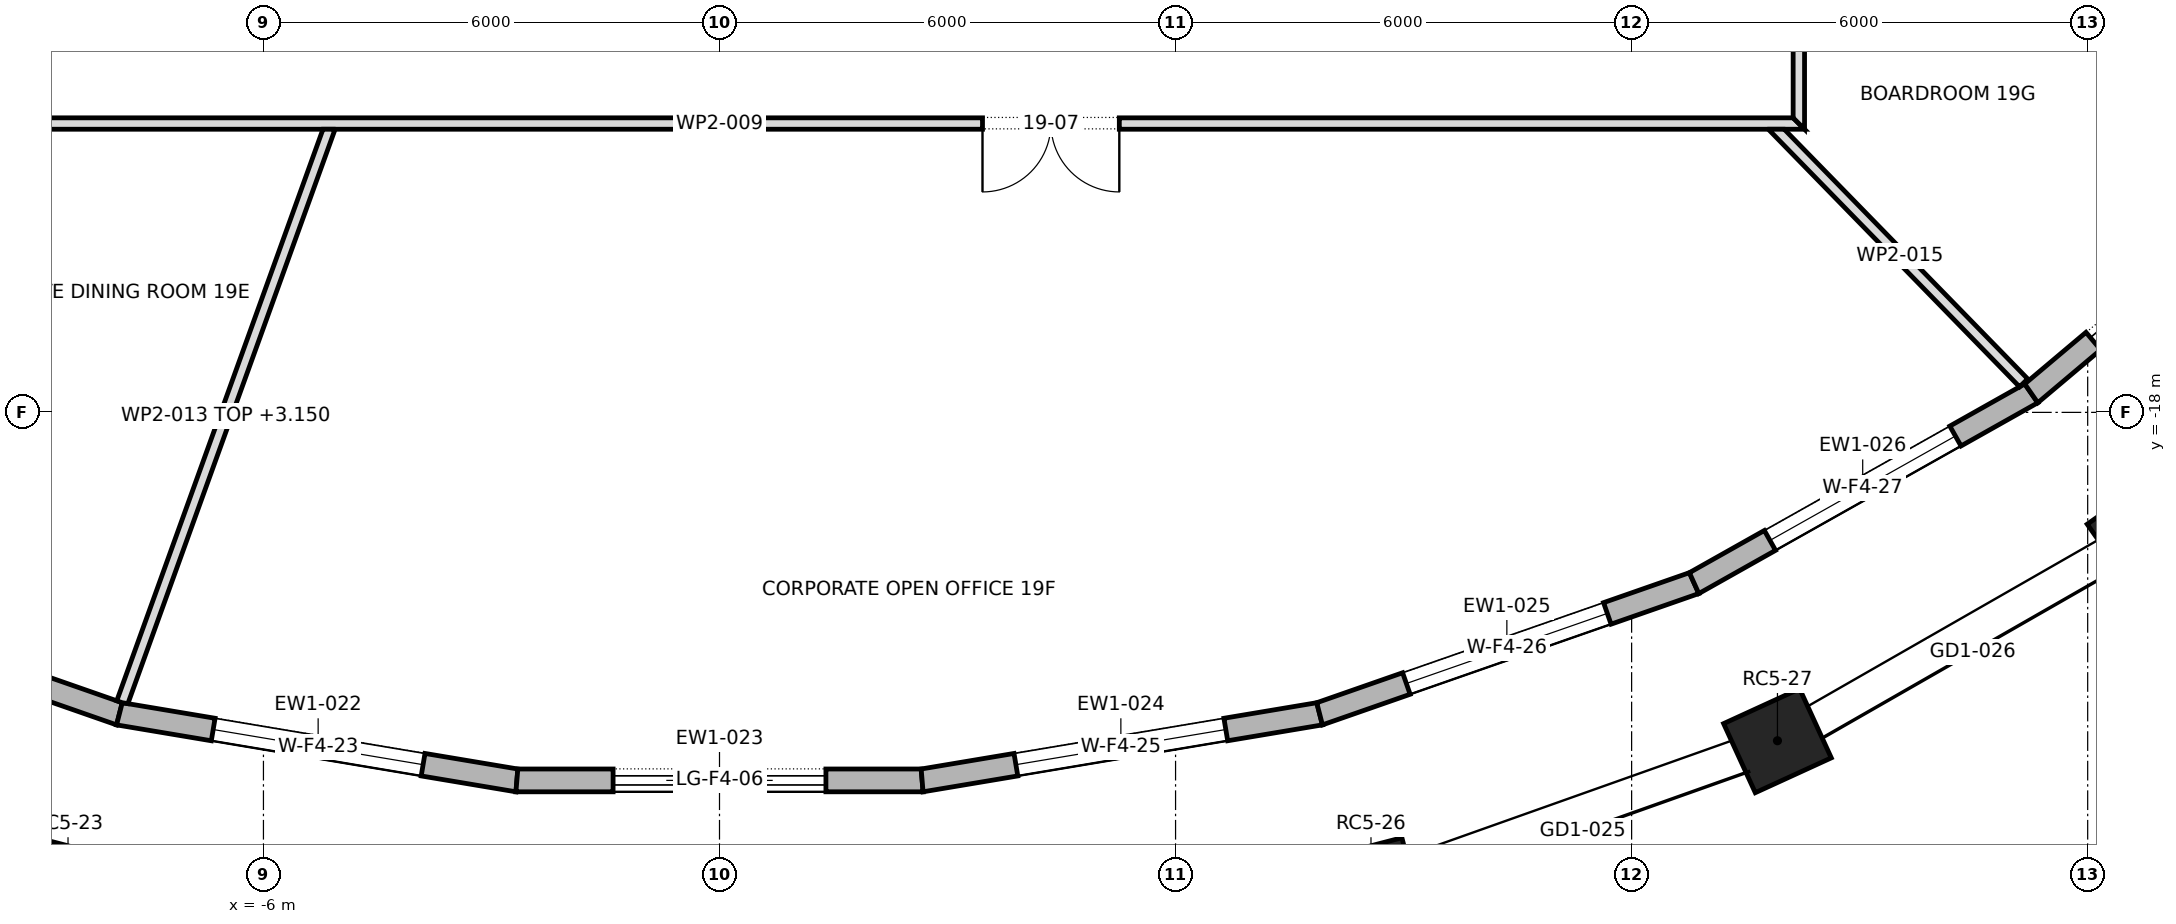
"""IFC4 building model, lengths in metres.
Left out: names, types, materials, properties, quantities, classifications, styles, units other than length and angle.
Written with IfcOpenShell. Run it as: python <this file> out.ifc"""

import sys

from ifc_helpers import new_model, si_unit, direction, frame, frame_2d, origin, origin_2d, place, context, subcontext, project, spatial, polyline, rectangle, outline, extrude, element, fill, save


model = new_model("IFC4")
c1 = context("Model", 3, precision=1e-05, world=origin(), true_north=direction((0.0, 1.0)))
c2 = subcontext(c1, "Body", "Model", "MODEL_VIEW")
j1 = project(units=[si_unit("LENGTHUNIT", "METRE"), si_unit("PLANEANGLEUNIT", "RADIAN")], contexts=[c1])
p1 = place(None, origin())
s1 = spatial("IfcSite", under=j1, at=p1, CompositionType="ELEMENT")
p2 = place(p1, origin())
s2 = spatial("IfcBuilding", under=s1, at=p2, CompositionType="ELEMENT")
p3 = place(p2, frame((0.0, 0.0, 276.3)))
s3 = spatial("IfcBuildingStorey", under=s2, at=p3, CompositionType="ELEMENT", Elevation=276.3)
for number, where, z_axis, x_axis in (
    (1, (-8.571, -24.219, 0.0), (0.0, 0.0, 1.0), (0.968, -0.252, 0.0)),
    (2, (8.571, -24.219, 0.0), (0.0, 0.0, 1.0), (0.968, 0.252, 0.0)),
    (3, (13.919, -22.32, 0.0), (0.0, 0.0, 1.0), (0.909, 0.417, 0.0)),
    (4, (18.731, -19.564, 0.0), (0.0, 0.0, 1.0), (0.818, 0.575, 0.0)),
):
    element("IfcColumn", number, at=place(p3, frame(where, z_axis=z_axis, x_axis=x_axis)), inside=s3, PredefinedType="COLUMN", context=c2, shape_type="SweptSolid", body=[
        extrude(rectangle(XDim=1.1, YDim=1.0, at=origin_2d()), origin(), (0.0, 0.0, 1.0), 4.0),
    ])
p4 = place(p3, frame((-12.822, -20.246, 0.0), z_axis=(0.0, 0.0, 1.0), x_axis=(0.9441693858, -0.329460423904, 0.0)))
e5 = element("IfcWall", 5, at=p4, inside=s3, PredefinedType="STANDARD", context=c2, shape_type="SweptSolid", body=[
    extrude(outline(polyline([(-0.013, -0.15), (5.231, -0.15), (5.206, 0.15), (0.013, 0.15), (-0.013, -0.15)])), origin(), (0.0, 0.0, 1.0), 3.7),
])
p5 = place(p4, frame((1.209, 0.0, 0.6)))
e6 = element("IfcOpeningElement", 6, at=p5, cuts=e5, PredefinedType="OPENING", context=c2, shape_type="SweptSolid", body=[
    extrude(rectangle(XDim=2.8, YDim=2.65, at=frame_2d((1.4, 1.325))), frame((0.0, 0.162, 0.0), z_axis=(0.0, -1.0, 0.0), x_axis=(1.0, 0.0, 0.0)), (0.0, 0.0, 1.0), 0.324),
])
p6 = place(p3, frame((-7.895, -21.966, 0.0), z_axis=(0.0, 0.0, 1.0), x_axis=(0.986250435411, -0.165257612993, 0.0)))
e7 = element("IfcWall", 7, at=p6, inside=s3, PredefinedType="STANDARD", context=c2, shape_type="SweptSolid", body=[
    extrude(outline(polyline([(-0.013, -0.15), (5.315, -0.15), (5.29, 0.15), (0.013, 0.15), (-0.013, -0.15)])), origin(), (0.0, 0.0, 1.0), 3.7),
])
p7 = place(p6, frame((1.251, 0.0, 0.6)))
e8 = element("IfcOpeningElement", 8, at=p7, cuts=e7, PredefinedType="OPENING", context=c2, shape_type="SweptSolid", body=[
    extrude(rectangle(XDim=2.8, YDim=2.65, at=frame_2d((1.4, 1.325))), frame((0.0, 0.162, 0.0), z_axis=(0.0, -1.0, 0.0), x_axis=(1.0, 0.0, 0.0)), (0.0, 0.0, 1.0), 0.324),
])
p8 = place(p3, frame((-2.666, -22.842, 0.0), z_axis=(0.0, 0.0, 1.0), x_axis=(1.0, 0.0, 0.0)))
e9 = element("IfcWall", 9, at=p8, inside=s3, PredefinedType="STANDARD", context=c2, shape_type="SweptSolid", body=[
    extrude(outline(polyline([(-0.012, -0.15), (5.344, -0.15), (5.319, 0.15), (0.012, 0.15), (-0.012, -0.15)])), origin(), (0.0, 0.0, 1.0), 3.7),
])
p9 = place(p8, frame((1.266, 0.0, 0.0)))
e10 = element("IfcOpeningElement", 10, at=p9, cuts=e9, PredefinedType="OPENING", context=c2, shape_type="SweptSolid", body=[
    extrude(rectangle(XDim=2.8, YDim=3.25, at=frame_2d((1.4, 1.625))), frame((0.0, 0.162, 0.0), z_axis=(0.0, -1.0, 0.0), x_axis=(1.0, 0.0, 0.0)), (0.0, 0.0, 1.0), 0.324),
])
p10 = place(p3, frame((2.666, -22.842, 0.0), z_axis=(0.0, 0.0, 1.0), x_axis=(0.986250435411, 0.165257612993, 0.0)))
e11 = element("IfcWall", 11, at=p10, inside=s3, PredefinedType="STANDARD", context=c2, shape_type="SweptSolid", body=[
    extrude(outline(polyline([(-0.012, -0.15), (5.315, -0.15), (5.29, 0.15), (0.012, 0.15), (-0.012, -0.15)])), origin(), (0.0, 0.0, 1.0), 3.7),
])
p11 = place(p10, frame((1.251, 0.0, 0.6)))
e12 = element("IfcOpeningElement", 12, at=p11, cuts=e11, PredefinedType="OPENING", context=c2, shape_type="SweptSolid", body=[
    extrude(rectangle(XDim=2.8, YDim=2.65, at=frame_2d((1.4, 1.325))), frame((0.0, 0.162, 0.0), z_axis=(0.0, -1.0, 0.0), x_axis=(1.0, 0.0, 0.0)), (0.0, 0.0, 1.0), 0.324),
])
p12 = place(p3, frame((7.895, -21.966, 0.0), z_axis=(0.0, 0.0, 1.0), x_axis=(0.9441693858, 0.329460423904, 0.0)))
e13 = element("IfcWall", 13, at=p12, inside=s3, PredefinedType="STANDARD", context=c2, shape_type="SweptSolid", body=[
    extrude(outline(polyline([(-0.013, -0.15), (5.232, -0.15), (5.205, 0.15), (0.013, 0.15), (-0.013, -0.15)])), origin(), (0.0, 0.0, 1.0), 3.7),
])
p13 = place(p12, frame((1.209, 0.0, 0.6)))
e14 = element("IfcOpeningElement", 14, at=p13, cuts=e13, PredefinedType="OPENING", context=c2, shape_type="SweptSolid", body=[
    extrude(rectangle(XDim=2.8, YDim=2.65, at=frame_2d((1.4, 1.325))), frame((0.0, 0.162, 0.0), z_axis=(0.0, -1.0, 0.0), x_axis=(1.0, 0.0, 0.0)), (0.0, 0.0, 1.0), 0.324),
])
p14 = place(p3, frame((12.822, -20.246, 0.0), z_axis=(0.0, 0.0, 1.0), x_axis=(0.871433320402, 0.490513983585, 0.0)))
e15 = element("IfcWall", 15, at=p14, inside=s3, PredefinedType="STANDARD", context=c2, shape_type="SweptSolid", body=[
    extrude(outline(polyline([(-0.013, -0.15), (5.104, -0.15), (5.076, 0.15), (0.013, 0.15), (-0.013, -0.15)])), origin(), (0.0, 0.0, 1.0), 3.7),
])
p15 = place(p14, frame((1.145, 0.0, 0.6)))
e16 = element("IfcOpeningElement", 16, at=p15, cuts=e15, PredefinedType="OPENING", context=c2, shape_type="SweptSolid", body=[
    extrude(rectangle(XDim=2.8, YDim=2.65, at=frame_2d((1.4, 1.325))), frame((0.0, 0.162, 0.0), z_axis=(0.0, -1.0, 0.0), x_axis=(1.0, 0.0, 0.0)), (0.0, 0.0, 1.0), 0.324),
])
p16 = place(p3, frame((17.258, -17.75, 0.0), z_axis=(0.0, 0.0, 1.0), x_axis=(0.764832940795, 0.644228664897, 0.0)))
e17 = element("IfcWall", 17, at=p16, inside=s3, PredefinedType="STANDARD", context=c2, shape_type="SweptSolid", body=[
    extrude(outline(polyline([(-0.014, -0.15), (4.95, -0.15), (4.92, 0.15), (0.014, 0.15), (-0.014, -0.15)])), origin(), (0.0, 0.0, 1.0), 3.7),
])
p17 = place(p16, frame((1.068, 0.0, 0.0)))
e18 = element("IfcOpeningElement", 18, at=p17, cuts=e17, PredefinedType="OPENING", context=c2, shape_type="SweptSolid", body=[
    extrude(rectangle(XDim=2.8, YDim=3.25, at=frame_2d((1.4, 1.625))), frame((0.0, 0.162, 0.0), z_axis=(0.0, -1.0, 0.0), x_axis=(1.0, 0.0, 0.0)), (0.0, 0.0, 1.0), 0.324),
])
p18 = place(p3, frame((-14.275, -14.2, 0.0), z_axis=(0.0, 0.0, 1.0), x_axis=(1.0, 0.0, 0.0)))
e19 = element("IfcWall", 19, at=p18, inside=s3, PredefinedType="PARTITIONING", context=c2, shape_type="SweptSolid", body=[
    extrude(outline(polyline([(28.55, -0.075), (28.55, -0.075), (28.4, 0.075), (26.517, 0.075), (24.633, 0.075), (22.75, 0.075), (20.866, 0.075), (18.983, 0.075), (17.1, 0.075), (15.217, 0.075), (13.333, 0.075), (11.45, 0.075), (9.567, 0.075), (7.683, 0.075), (5.8, 0.075), (3.917, 0.075), (2.033, 0.075), (0.15, 0.075), (0.0, -0.075), (1.903, -0.075), (3.807, -0.075), (5.71, -0.075), (7.613, -0.075), (9.517, -0.075), (11.42, -0.075), (13.323, -0.075), (15.227, -0.075), (17.13, -0.075), (19.033, -0.075), (20.937, -0.075), (22.84, -0.075), (24.743, -0.075), (26.646, -0.075), (28.55, -0.075)])), origin(), (0.0, 0.0, 1.0), 3.7),
])
p19 = place(p18, frame((4.305, 0.0, 0.0)))
e20 = element("IfcOpeningElement", 20, at=p19, cuts=e19, PredefinedType="OPENING", context=c2, shape_type="SweptSolid", body=[
    extrude(rectangle(XDim=1.0, YDim=2.1, at=frame_2d((0.5, 1.05))), frame((0.0, 0.087, 0.0), z_axis=(0.0, -1.0, 0.0), x_axis=(1.0, 0.0, 0.0)), (0.0, 0.0, 1.0), 0.174),
])
p20 = place(p18, frame((17.735, 0.0, 0.0)))
e21 = element("IfcOpeningElement", 21, at=p20, cuts=e19, PredefinedType="OPENING", context=c2, shape_type="SweptSolid", body=[
    extrude(rectangle(XDim=1.8, YDim=2.1, at=frame_2d((0.9, 1.05))), frame((0.0, 0.087, 0.0), z_axis=(0.0, -1.0, 0.0), x_axis=(1.0, 0.0, 0.0)), (0.0, 0.0, 1.0), 0.174),
])
p21 = place(p3, frame((-5.128, -14.25, 0.0), z_axis=(0.0, 0.0, 1.0), x_axis=(-0.339369350229, -0.940653200773, 0.0)))
e22 = element("IfcWall", 22, at=p21, inside=s3, PredefinedType="PARTITIONING", context=c2, shape_type="SweptSolid", body=[
    extrude(outline(polyline([(8.047, -0.075), (8.047, -0.03), (8.047, 0.001), (8.033, 0.075), (6.427, 0.075), (4.82, 0.075), (3.213, 0.075), (1.607, 0.075), (0.0, 0.075), (0.0, 0.074), (0.054, -0.075), (2.052, -0.075), (4.05, -0.075), (6.049, -0.075), (8.047, -0.075)])), origin(), (0.0, 0.0, 1.0), 3.15),
])
p22 = place(p3, frame((13.852, -14.223, 0.0), z_axis=(0.0, 0.0, 1.0), x_axis=(0.69820654799, -0.715896372629, 0.0)))
e23 = element("IfcWall", 23, at=p22, inside=s3, PredefinedType="PARTITIONING", context=c2, shape_type="SweptSolid", body=[
    extrude(outline(polyline([(0.0, -0.075), (1.578, -0.075), (3.156, -0.075), (4.734, -0.075), (4.734, -0.075), (4.734, 0.075), (3.205, 0.075), (1.675, 0.075), (0.146, 0.075), (0.0, -0.075), (0.0, -0.075)])), origin(), (0.0, 0.0, 1.0), 3.7),
])
p23 = place(p3, frame((14.2, -14.275, 0.0), z_axis=(0.0, 0.0, 1.0), x_axis=(0.0, 1.0, 0.0)))
e24 = element("IfcWall", 24, at=p23, inside=s3, PredefinedType="PARTITIONING", context=c2, shape_type="SweptSolid", body=[
    extrude(outline(polyline([(28.55, -0.075), (28.55, -0.075), (28.4, 0.075), (26.517, 0.075), (24.633, 0.075), (22.75, 0.075), (20.866, 0.075), (18.983, 0.075), (17.1, 0.075), (15.217, 0.075), (13.333, 0.075), (11.45, 0.075), (9.567, 0.075), (7.683, 0.075), (5.8, 0.075), (3.917, 0.075), (2.033, 0.075), (0.15, 0.075), (0.0, -0.075), (1.903, -0.075), (3.807, -0.075), (5.71, -0.075), (7.613, -0.075), (9.517, -0.075), (11.42, -0.075), (13.323, -0.075), (15.227, -0.075), (17.13, -0.075), (19.033, -0.075), (20.937, -0.075), (22.84, -0.075), (24.743, -0.075), (26.646, -0.075), (28.55, -0.075)])), origin(), (0.0, 0.0, 1.0), 3.7),
])
p24 = place(p23, frame((3.48, 0.0, 0.0)))
e25 = element("IfcOpeningElement", 25, at=p24, cuts=e24, PredefinedType="OPENING", context=c2, shape_type="SweptSolid", body=[
    extrude(rectangle(XDim=1.0, YDim=2.1, at=frame_2d((0.5, 1.05))), frame((0.0, 0.087, 0.0), z_axis=(0.0, -1.0, 0.0), x_axis=(1.0, 0.0, 0.0)), (0.0, 0.0, 1.0), 0.174),
])
p25 = place(p23, frame((9.99, 0.0, 0.0)))
e26 = element("IfcOpeningElement", 26, at=p25, cuts=e24, PredefinedType="OPENING", context=c2, shape_type="SweptSolid", body=[
    extrude(rectangle(XDim=1.0, YDim=2.1, at=frame_2d((0.5, 1.05))), frame((0.0, 0.087, 0.0), z_axis=(0.0, -1.0, 0.0), x_axis=(1.0, 0.0, 0.0)), (0.0, 0.0, 1.0), 0.174),
])
p26 = place(p23, frame((15.0, 0.0, 0.0)))
e27 = element("IfcOpeningElement", 27, at=p26, cuts=e24, PredefinedType="OPENING", context=c2, shape_type="SweptSolid", body=[
    extrude(rectangle(XDim=1.0, YDim=2.1, at=frame_2d((0.5, 1.05))), frame((0.0, 0.087, 0.0), z_axis=(0.0, -1.0, 0.0), x_axis=(1.0, 0.0, 0.0)), (0.0, 0.0, 1.0), 0.174),
])
p27 = place(p23, frame((22.69, 0.0, 0.0)))
e28 = element("IfcOpeningElement", 28, at=p27, cuts=e24, PredefinedType="OPENING", context=c2, shape_type="SweptSolid", body=[
    extrude(rectangle(XDim=1.0, YDim=2.1, at=frame_2d((0.5, 1.05))), frame((0.0, 0.087, 0.0), z_axis=(0.0, -1.0, 0.0), x_axis=(1.0, 0.0, 0.0)), (0.0, 0.0, 1.0), 0.174),
])
p28 = place(p7, origin())
e29 = element("IfcWindow", 29, at=p28, inside=s3, PartitioningType="DOUBLE_PANEL_VERTICAL", PredefinedType="WINDOW", context=c2, shape_type="SweptSolid", body=[
    extrude(rectangle(XDim=2.8, YDim=2.65, at=frame_2d((1.4, 1.325))), frame((0.0, 0.03, 0.0), z_axis=(0.0, -1.0, 0.0), x_axis=(1.0, 0.0, 0.0)), (0.0, 0.0, 1.0), 0.06),
])
fill(e8, e29)
p29 = place(p9, origin())
e30 = element("IfcDoor", 30, at=p29, inside=s3, OperationType="DOUBLE_DOOR_SLIDING", PredefinedType="DOOR", context=c2, shape_type="SweptSolid", body=[
    extrude(rectangle(XDim=2.8, YDim=3.25, at=frame_2d((1.4, 1.625))), frame((0.0, 0.025, 0.0), z_axis=(0.0, -1.0, 0.0), x_axis=(1.0, 0.0, 0.0)), (0.0, 0.0, 1.0), 0.05),
])
fill(e10, e30)
p30 = place(p11, origin())
e31 = element("IfcWindow", 31, at=p30, inside=s3, PartitioningType="DOUBLE_PANEL_VERTICAL", PredefinedType="WINDOW", context=c2, shape_type="SweptSolid", body=[
    extrude(rectangle(XDim=2.8, YDim=2.65, at=frame_2d((1.4, 1.325))), frame((0.0, 0.03, 0.0), z_axis=(0.0, -1.0, 0.0), x_axis=(1.0, 0.0, 0.0)), (0.0, 0.0, 1.0), 0.06),
])
fill(e12, e31)
p31 = place(p13, origin())
e32 = element("IfcWindow", 32, at=p31, inside=s3, PartitioningType="DOUBLE_PANEL_VERTICAL", PredefinedType="WINDOW", context=c2, shape_type="SweptSolid", body=[
    extrude(rectangle(XDim=2.8, YDim=2.65, at=frame_2d((1.4, 1.325))), frame((0.0, 0.03, 0.0), z_axis=(0.0, -1.0, 0.0), x_axis=(1.0, 0.0, 0.0)), (0.0, 0.0, 1.0), 0.06),
])
fill(e14, e32)
p32 = place(p15, origin())
e33 = element("IfcWindow", 33, at=p32, inside=s3, PartitioningType="DOUBLE_PANEL_VERTICAL", PredefinedType="WINDOW", context=c2, shape_type="SweptSolid", body=[
    extrude(rectangle(XDim=2.8, YDim=2.65, at=frame_2d((1.4, 1.325))), frame((0.0, 0.03, 0.0), z_axis=(0.0, -1.0, 0.0), x_axis=(1.0, 0.0, 0.0)), (0.0, 0.0, 1.0), 0.06),
])
fill(e16, e33)
p33 = place(p17, origin())
e34 = element("IfcDoor", 34, at=p33, inside=s3, OperationType="DOUBLE_DOOR_SLIDING", PredefinedType="DOOR", context=c2, shape_type="SweptSolid", body=[
    extrude(rectangle(XDim=2.8, YDim=3.25, at=frame_2d((1.4, 1.625))), frame((0.0, 0.025, 0.0), z_axis=(0.0, -1.0, 0.0), x_axis=(1.0, 0.0, 0.0)), (0.0, 0.0, 1.0), 0.05),
])
fill(e18, e34)
p34 = place(p20, frame((1.8, 0.0, 0.0), z_axis=(0.0, 0.0, 1.0), x_axis=(-1.0, 0.0, 0.0)))
e35 = element("IfcDoor", 35, at=p34, inside=s3, OperationType="DOUBLE_DOOR_SINGLE_SWING", PredefinedType="DOOR", context=c2, shape_type="SweptSolid", body=[
    extrude(rectangle(XDim=1.8, YDim=2.1, at=frame_2d((0.9, 1.05))), frame((0.0, 0.025, 0.0), z_axis=(0.0, -1.0, 0.0), x_axis=(1.0, 0.0, 0.0)), (0.0, 0.0, 1.0), 0.05),
])
fill(e21, e35)
save(model, sys.argv[1])
